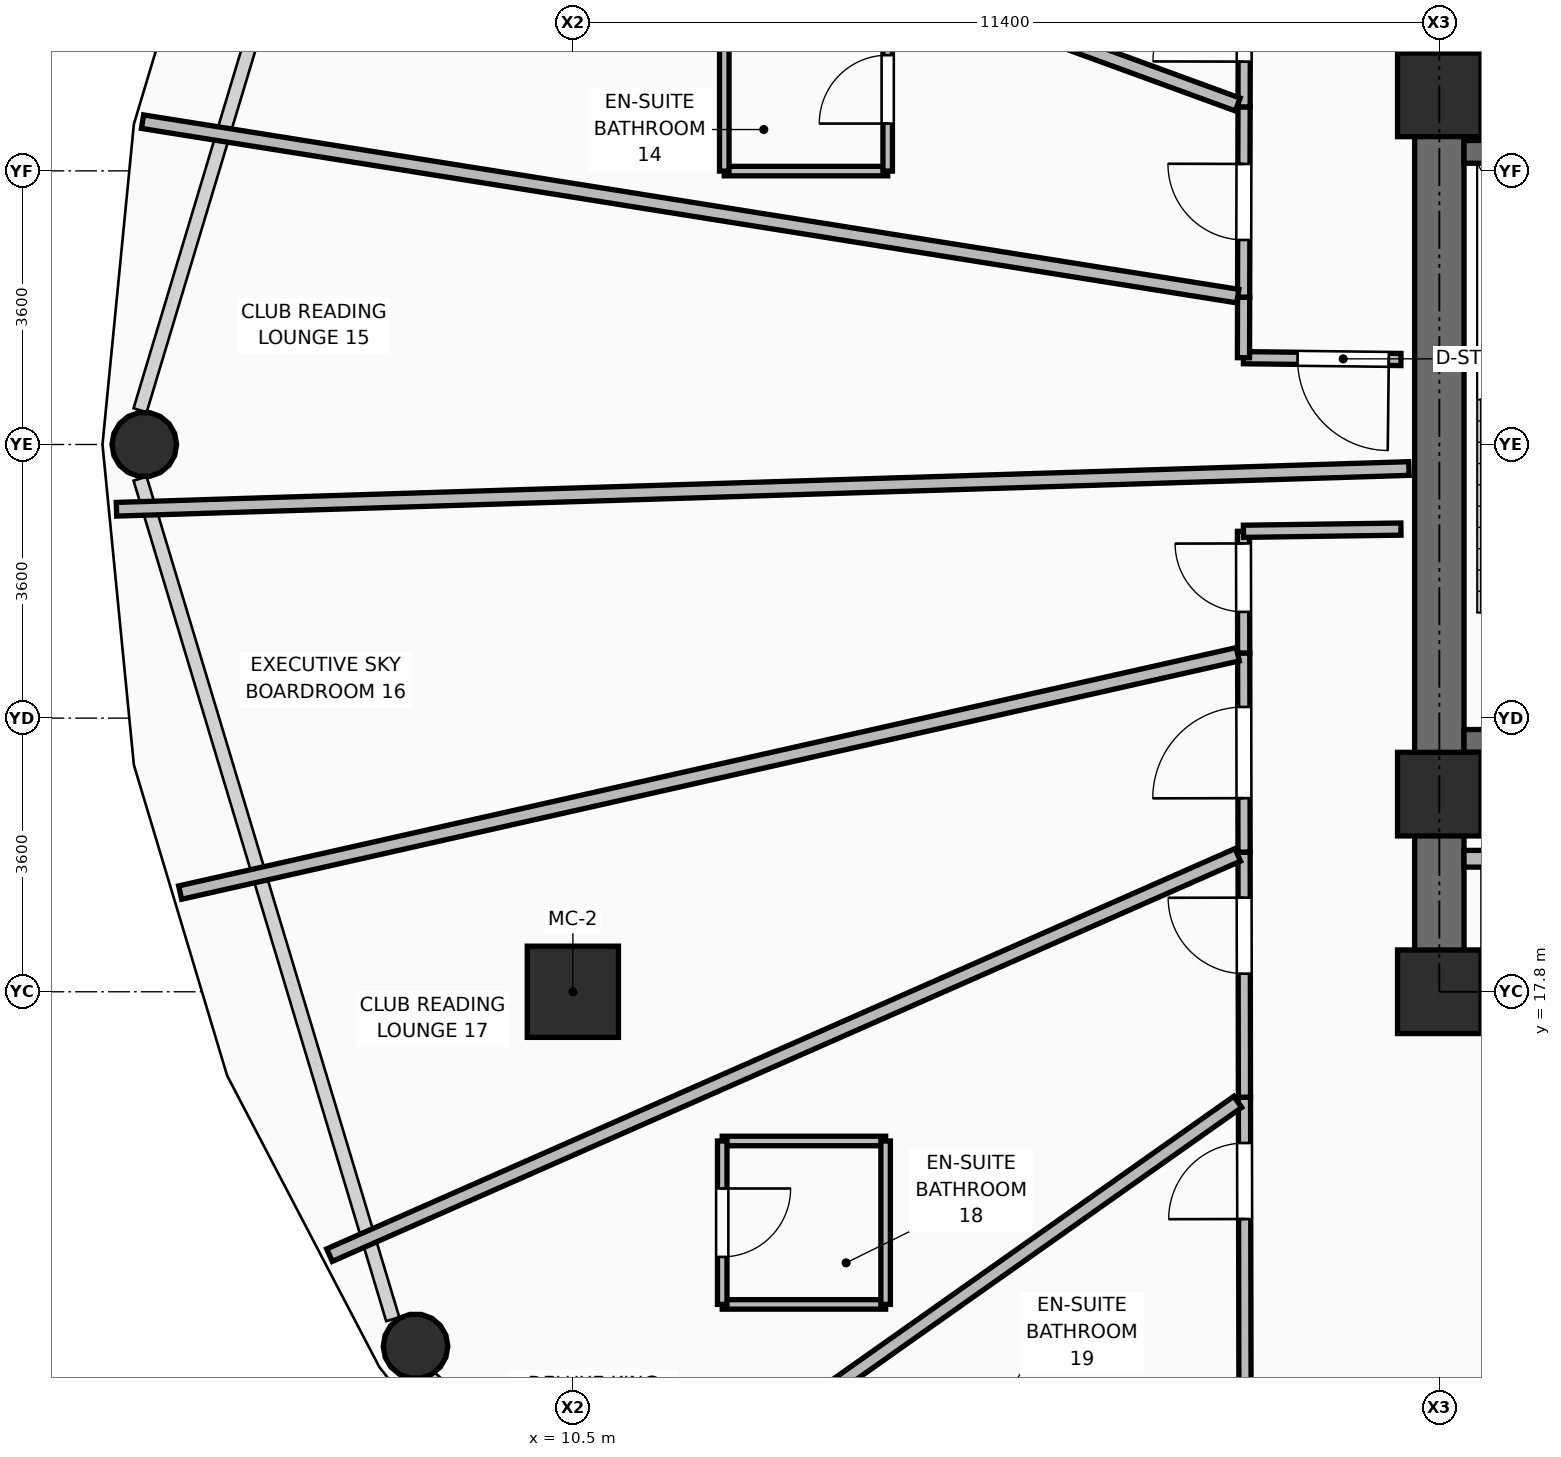
"""IFC4 building model, lengths in metres.
Left out: names, types, materials, properties, quantities, classifications, styles, units other than length and angle.
Written with IfcOpenShell. Run it as: python <this file> out.ifc"""

import sys

from ifc_helpers import new_model, si_unit, direction, frame, frame_2d, origin, origin_2d, place, context, subcontext, project, spatial, rectangle, hollow_rectangle, hollow_circle, extrude, element, fill, save


model = new_model("IFC4")
c1 = context("Model", 3, precision=1e-05, world=origin(), true_north=direction((0.0, 1.0)))
c2 = subcontext(c1, "Body", "Model", "MODEL_VIEW")
j1 = project(units=[si_unit("LENGTHUNIT", "METRE"), si_unit("PLANEANGLEUNIT", "RADIAN")], contexts=[c1])
p1 = place(None, origin())
s1 = spatial("IfcSite", under=j1, at=p1, CompositionType="ELEMENT")
p2 = place(p1, origin())
s2 = spatial("IfcBuilding", under=s1, at=p2, CompositionType="ELEMENT")
p3 = place(p2, frame((0.0, 0.0, 53.25)))
s3 = spatial("IfcBuildingStorey", under=s2, at=p3, CompositionType="ELEMENT", Elevation=53.25)
for number, where, z_axis, x_axis in (
    (1, (21.9, 17.8, 0.0), (0.0, 0.0, 1.0), (1.0, 0.0, 0.0)),
    (2, (21.9, 20.4, 0.0), (0.0, 0.0, 1.0), (1.0, 0.0, 0.0)),
    (3, (21.9, 29.6, 0.0), (0.0, 0.0, 1.0), (1.0, 0.0, 0.0)),
):
    element("IfcColumn", number, at=place(p3, frame(where, z_axis=z_axis, x_axis=x_axis)), inside=s3, PredefinedType="COLUMN", context=c2, shape_type="SweptSolid", body=[
        extrude(rectangle(XDim=1.1, YDim=1.1, at=origin_2d()), origin(), (0.0, 0.0, 1.0), 3.75),
    ])
p4 = place(p3, frame((10.5, 17.8, 0.0), z_axis=(0.0, 0.0, 1.0), x_axis=(1.0, 0.0, 0.0)))
e4 = element("IfcColumn", 4, at=p4, inside=s3, PredefinedType="COLUMN", context=c2, shape_type="SweptSolid", body=[
    extrude(hollow_rectangle(XDim=1.2, YDim=1.2, WallThickness=0.045, at=origin_2d()), origin(), (0.0, 0.0, 1.0), 3.75),
])
p5 = place(p3, frame((4.861, 25.0, 0.0), z_axis=(-0.221785382613, 0.0, 0.975095505096), x_axis=(0.0, -1.0, 0.0)))
e5 = element("IfcColumn", 5, at=p5, inside=s3, PredefinedType="COLUMN", context=c2, shape_type="SweptSolid", body=[
    extrude(hollow_circle(Radius=0.425, WallThickness=0.04, at=origin_2d()), origin(), (0.0, 0.0, 1.0), 3.661),
])
p6 = place(p3, frame((8.43, 13.137, 0.0), z_axis=(-0.192218909821, -0.099280833242, 0.976317165095), x_axis=(0.458902314779, -0.888486727808, 0.0)))
e6 = element("IfcColumn", 6, at=p6, inside=s3, PredefinedType="COLUMN", context=c2, shape_type="SweptSolid", body=[
    extrude(hollow_circle(Radius=0.425, WallThickness=0.04, at=origin_2d()), origin(), (0.0, 0.0, 1.0), 3.657),
])
p7 = place(p3, frame((21.575, 17.8, 0.0), z_axis=(0.0, 0.0, 1.0), x_axis=(1.0, 0.0, 0.0)))
e7 = element("IfcWall", 7, at=p7, inside=s3, PredefinedType="SHEAR", context=c2, shape_type="SweptSolid", body=[
    extrude(rectangle(XDim=2.175, YDim=0.65, at=frame_2d((1.087, 0.0))), origin(), (0.0, 0.0, 1.0), 3.57),
])
p8 = place(p3, frame((21.9, 18.125, 0.0), z_axis=(0.0, 0.0, 1.0), x_axis=(0.0, 1.0, 0.0)))
e8 = element("IfcWall", 8, at=p8, inside=s3, PredefinedType="SHEAR", context=c2, shape_type="SweptSolid", body=[
    extrude(rectangle(XDim=14.0, YDim=0.65, at=frame_2d((7.0, 0.0))), origin(), (0.0, 0.0, 1.0), 3.57),
])
p9 = place(p3, frame((22.225, 21.1, 0.0), z_axis=(0.0, 0.0, 1.0), x_axis=(1.0, 0.0, 0.0)))
e9 = element("IfcWall", 9, at=p9, inside=s3, PredefinedType="SHEAR", context=c2, shape_type="SweptSolid", body=[
    extrude(rectangle(XDim=3.515, YDim=0.3, at=frame_2d((1.757, 0.0))), origin(), (0.0, 0.0, 1.0), 3.57),
])
p10 = place(p9, frame((1.995, 0.0, 0.0)))
e10 = element("IfcOpeningElement", 10, at=p10, cuts=e9, PredefinedType="OPENING", context=c2, shape_type="SweptSolid", body=[
    extrude(rectangle(XDim=1.05, YDim=2.1, at=frame_2d((0.525, 1.05))), frame((0.0, 0.16, 0.0), z_axis=(0.0, -1.0, 0.0), x_axis=(1.0, 0.0, 0.0)), (0.0, 0.0, 1.0), 0.32),
])
p11 = place(p3, frame((22.225, 28.85, 0.0), z_axis=(0.0, 0.0, 1.0), x_axis=(1.0, 0.0, 0.0)))
e11 = element("IfcWall", 11, at=p11, inside=s3, PredefinedType="SHEAR", context=c2, shape_type="SweptSolid", body=[
    extrude(rectangle(XDim=3.515, YDim=0.3, at=frame_2d((1.757, 0.0))), origin(), (0.0, 0.0, 1.0), 3.57),
])
p12 = place(p3, frame((22.225, 19.55, 0.0), z_axis=(0.0, 0.0, 1.0), x_axis=(1.0, 0.0, 0.0)))
e12 = element("IfcWall", 12, at=p12, inside=s3, PredefinedType="PARTITIONING", context=c2, shape_type="SweptSolid", body=[
    extrude(rectangle(XDim=1.565, YDim=0.22, at=frame_2d((0.782, 0.0))), origin(), (0.0, 0.0, 1.0), 2.595),
])
p13 = place(p3, frame((21.395, 26.118, 0.0), z_axis=(0.0, 0.0, 1.0), x_axis=(-0.999931972005, 0.011664105718, 0.0)))
e13 = element("IfcWall", 13, at=p13, inside=s3, PredefinedType="PARTITIONING", context=c2, shape_type="SweptSolid", body=[
    extrude(rectangle(XDim=2.072, YDim=0.16, at=frame_2d((1.036, 0.0))), origin(), (0.0, 0.0, 1.0), 3.55),
])
p14 = place(p13, frame((0.16, 0.0, 0.0)))
e14 = element("IfcOpeningElement", 14, at=p14, cuts=e13, PredefinedType="OPENING", context=c2, shape_type="SweptSolid", body=[
    extrude(rectangle(XDim=1.2, YDim=2.1, at=frame_2d((0.6, 1.05))), frame((0.0, 0.09, 0.0), z_axis=(0.0, -1.0, 0.0), x_axis=(1.0, 0.0, 0.0)), (0.0, 0.0, 1.0), 0.18),
])
p15 = place(p3, frame((19.323, 26.142, 0.0), z_axis=(0.0, 0.0, 1.0), x_axis=(0.00245097303, 0.999996996361, 0.0)))
e15 = element("IfcWall", 15, at=p15, inside=s3, PredefinedType="PARTITIONING", context=c2, shape_type="SweptSolid", body=[
    extrude(rectangle(XDim=0.797, YDim=0.16, at=frame_2d((0.398, 0.0))), origin(), (0.0, 0.0, 1.0), 3.55),
])
p16 = place(p3, frame((19.325, 26.939, 0.0), z_axis=(0.0, 0.0, 1.0), x_axis=(0.002438541325, 0.999997026754, 0.0)))
e16 = element("IfcWall", 16, at=p16, inside=s3, PredefinedType="PARTITIONING", context=c2, shape_type="SweptSolid", body=[
    extrude(rectangle(XDim=2.503, YDim=0.16, at=frame_2d((1.251, 0.0))), origin(), (0.0, 0.0, 1.0), 3.55),
])
p17 = place(p16, frame((0.752, 0.0, 0.0)))
e17 = element("IfcOpeningElement", 17, at=p17, cuts=e16, PredefinedType="OPENING", context=c2, shape_type="SweptSolid", body=[
    extrude(rectangle(XDim=1.0, YDim=2.1, at=frame_2d((0.5, 1.05))), frame((0.0, 0.09, 0.0), z_axis=(0.0, -1.0, 0.0), x_axis=(1.0, 0.0, 0.0)), (0.0, 0.0, 1.0), 0.18),
])
p18 = place(p3, frame((19.331, 29.442, 0.0), z_axis=(0.0, 0.0, 1.0), x_axis=(0.002301489877, 0.999997351569, 0.0)))
e18 = element("IfcWall", 18, at=p18, inside=s3, PredefinedType="PARTITIONING", context=c2, shape_type="SweptSolid", body=[
    extrude(rectangle(XDim=2.97, YDim=0.16, at=frame_2d((1.485, 0.0))), origin(), (0.0, 0.0, 1.0), 3.55),
])
p19 = place(p18, frame((0.595, 0.0, 0.0)))
e19 = element("IfcOpeningElement", 19, at=p19, cuts=e18, PredefinedType="OPENING", context=c2, shape_type="SweptSolid", body=[
    extrude(rectangle(XDim=1.2, YDim=2.1, at=frame_2d((0.6, 1.05))), frame((0.0, 0.09, 0.0), z_axis=(0.0, -1.0, 0.0), x_axis=(1.0, 0.0, 0.0)), (0.0, 0.0, 1.0), 0.18),
])
p20 = place(p3, frame((19.344, 11.992, 0.0), z_axis=(0.0, 0.0, 1.0), x_axis=(-0.001822295279, 0.999998339619, 0.0)))
e20 = element("IfcWall", 20, at=p20, inside=s3, PredefinedType="PARTITIONING", context=c2, shape_type="SweptSolid", body=[
    extrude(rectangle(XDim=4.421, YDim=0.16, at=frame_2d((2.21, 0.0))), origin(), (0.0, 0.0, 1.0), 3.55),
])
p21 = place(p20, frame((2.818, 0.0, 0.0)))
e21 = element("IfcOpeningElement", 21, at=p21, cuts=e20, PredefinedType="OPENING", context=c2, shape_type="SweptSolid", body=[
    extrude(rectangle(XDim=1.0, YDim=2.1, at=frame_2d((0.5, 1.05))), frame((0.0, 0.09, 0.0), z_axis=(0.0, -1.0, 0.0), x_axis=(1.0, 0.0, 0.0)), (0.0, 0.0, 1.0), 0.18),
])
p22 = place(p3, frame((19.336, 16.413, 0.0), z_axis=(0.0, 0.0, 1.0), x_axis=(-0.001514576074, 0.999998853029, 0.0)))
e22 = element("IfcWall", 22, at=p22, inside=s3, PredefinedType="PARTITIONING", context=c2, shape_type="SweptSolid", body=[
    extrude(rectangle(XDim=3.224, YDim=0.16, at=frame_2d((1.612, 0.0))), origin(), (0.0, 0.0, 1.0), 2.928),
])
p23 = place(p22, frame((1.625, 0.0, 0.0)))
e23 = element("IfcOpeningElement", 23, at=p23, cuts=e22, PredefinedType="OPENING", context=c2, shape_type="SweptSolid", body=[
    extrude(rectangle(XDim=1.0, YDim=2.1, at=frame_2d((0.5, 1.05))), frame((0.0, 0.09, 0.0), z_axis=(0.0, -1.0, 0.0), x_axis=(1.0, 0.0, 0.0)), (0.0, 0.0, 1.0), 0.18),
])
p24 = place(p3, frame((19.331, 19.637, 0.0), z_axis=(0.0, 0.0, 1.0), x_axis=(-0.001956761069, 0.999998085541, 0.0)))
e24 = element("IfcWall", 24, at=p24, inside=s3, PredefinedType="PARTITIONING", context=c2, shape_type="SweptSolid", body=[
    extrude(rectangle(XDim=2.62, YDim=0.16, at=frame_2d((1.31, 0.0))), origin(), (0.0, 0.0, 1.0), 2.928),
])
p25 = place(p24, frame((0.71, 0.0, 0.0)))
e25 = element("IfcOpeningElement", 25, at=p25, cuts=e24, PredefinedType="OPENING", context=c2, shape_type="SweptSolid", body=[
    extrude(rectangle(XDim=1.2, YDim=2.1, at=frame_2d((0.6, 1.05))), frame((0.0, 0.09, 0.0), z_axis=(0.0, -1.0, 0.0), x_axis=(1.0, 0.0, 0.0)), (0.0, 0.0, 1.0), 0.18),
])
p26 = place(p3, frame((19.326, 22.257, 0.0), z_axis=(0.0, 0.0, 1.0), x_axis=(-0.001830102166, 0.999998325362, 0.0)))
e26 = element("IfcWall", 26, at=p26, inside=s3, PredefinedType="PARTITIONING", context=c2, shape_type="SweptSolid", body=[
    extrude(rectangle(XDim=1.601, YDim=0.16, at=frame_2d((0.8, 0.0))), origin(), (0.0, 0.0, 1.0), 3.55),
])
p27 = place(p26, frame((0.541, 0.0, 0.0)))
e27 = element("IfcOpeningElement", 27, at=p27, cuts=e26, PredefinedType="OPENING", context=c2, shape_type="SweptSolid", body=[
    extrude(rectangle(XDim=0.9, YDim=2.1, at=frame_2d((0.45, 1.05))), frame((0.0, 0.09, 0.0), z_axis=(0.0, -1.0, 0.0), x_axis=(1.0, 0.0, 0.0)), (0.0, 0.0, 1.0), 0.18),
])
p28 = place(p3, frame((19.323, 23.858, 0.0), z_axis=(0.0, 0.0, 1.0), x_axis=(0.999901714038, 0.014020066451, 0.0)))
e28 = element("IfcWall", 28, at=p28, inside=s3, PredefinedType="PARTITIONING", context=c2, shape_type="SweptSolid", body=[
    extrude(rectangle(XDim=2.072, YDim=0.16, at=frame_2d((1.036, 0.0))), origin(), (0.0, 0.0, 1.0), 3.55),
])
p29 = place(p3, frame((19.248, 29.473, 0.0), z_axis=(0.0, 0.0, 1.0), x_axis=(-0.939376353179, 0.34288783456, 0.0)))
e29 = element("IfcWall", 29, at=p29, inside=s3, PredefinedType="PARTITIONING", context=c2, shape_type="SweptSolid", body=[
    extrude(rectangle(XDim=13.576, YDim=0.18, at=frame_2d((6.788, 0.0))), origin(), (0.0, 0.0, 1.0), 2.775),
])
p30 = place(p3, frame((19.248, 26.952, 0.0), z_axis=(0.0, 0.0, 1.0), x_axis=(-0.987552205461, 0.157291581112, 0.0)))
e30 = element("IfcWall", 30, at=p30, inside=s3, PredefinedType="PARTITIONING", context=c2, shape_type="SweptSolid", body=[
    extrude(rectangle(XDim=14.592, YDim=0.18, at=frame_2d((7.296, 0.0))), origin(), (0.0, 0.0, 1.0), 2.775),
])
p31 = place(p3, frame((21.5, 24.684, 0.0), z_axis=(0.0, 0.0, 1.0), x_axis=(-0.999503357518, -0.031512510382, 0.0)))
e31 = element("IfcWall", 31, at=p31, inside=s3, PredefinedType="PARTITIONING", context=c2, shape_type="SweptSolid", body=[
    extrude(rectangle(XDim=17.013, YDim=0.18, at=frame_2d((8.507, 0.0))), origin(), (0.0, 0.0, 1.0), 2.595),
])
p32 = place(p3, frame((19.248, 22.24, 0.0), z_axis=(0.0, 0.0, 1.0), x_axis=(-0.975547769482, -0.219787509789, 0.0)))
e32 = element("IfcWall", 32, at=p32, inside=s3, PredefinedType="PARTITIONING", context=c2, shape_type="SweptSolid", body=[
    extrude(rectangle(XDim=14.264, YDim=0.18, at=frame_2d((7.132, 0.0))), origin(), (0.0, 0.0, 1.0), 2.775),
])
p33 = place(p3, frame((19.248, 19.601, 0.0), z_axis=(0.0, 0.0, 1.0), x_axis=(-0.915085250617, -0.403260442025, 0.0)))
e33 = element("IfcWall", 33, at=p33, inside=s3, PredefinedType="PARTITIONING", context=c2, shape_type="SweptSolid", body=[
    extrude(rectangle(XDim=13.059, YDim=0.18, at=frame_2d((6.529, 0.0))), origin(), (0.0, 0.0, 1.0), 2.775),
])
p34 = place(p3, frame((19.248, 16.351, 0.0), z_axis=(0.0, 0.0, 1.0), x_axis=(-0.816958598031, -0.576696323123, 0.0)))
e34 = element("IfcWall", 34, at=p34, inside=s3, PredefinedType="PARTITIONING", context=c2, shape_type="SweptSolid", body=[
    extrude(rectangle(XDim=10.954, YDim=0.18, at=frame_2d((5.477, 0.0))), origin(), (0.0, 0.0, 1.0), 2.775),
])
for number, where, z_axis, x_axis in (
    (35, (12.492, 28.597, 0.0), (0.0, 0.0, 1.0), (1.0, 0.0, 0.0)),
    (36, (12.492, 28.597, 0.0), (0.0, 0.0, 1.0), (0.0, 1.0, 0.0)),
):
    element("IfcWall", number, at=place(p3, frame(where, z_axis=z_axis, x_axis=x_axis)), inside=s3, PredefinedType="PARTITIONING", context=c2, shape_type="SweptSolid", body=[
        extrude(rectangle(XDim=2.15, YDim=0.125, at=frame_2d((1.075, 0.0))), origin(), (0.0, 0.0, 1.0), 3.55),
    ])
p35 = place(p3, frame((14.642, 28.597, 0.0), z_axis=(0.0, 0.0, 1.0), x_axis=(0.0, 1.0, 0.0)))
e37 = element("IfcWall", 37, at=p35, inside=s3, PredefinedType="PARTITIONING", context=c2, shape_type="SweptSolid", body=[
    extrude(rectangle(XDim=2.15, YDim=0.125, at=frame_2d((1.075, 0.0))), origin(), (0.0, 0.0, 1.0), 3.55),
])
p36 = place(p35, frame((0.625, 0.0, 0.0)))
e38 = element("IfcOpeningElement", 38, at=p36, cuts=e37, PredefinedType="OPENING", context=c2, shape_type="SweptSolid", body=[
    extrude(rectangle(XDim=0.9, YDim=2.1, at=frame_2d((0.45, 1.05))), frame((0.0, 0.073, 0.0), z_axis=(0.0, -1.0, 0.0), x_axis=(1.0, 0.0, 0.0)), (0.0, 0.0, 1.0), 0.145),
])
for number, where, z_axis, x_axis in (
    (39, (12.465, 13.687, 0.0), (0.0, 0.0, 1.0), (1.0, 0.0, 0.0)),
    (40, (12.465, 15.837, 0.0), (0.0, 0.0, 1.0), (1.0, 0.0, 0.0)),
):
    element("IfcWall", number, at=place(p3, frame(where, z_axis=z_axis, x_axis=x_axis)), inside=s3, PredefinedType="PARTITIONING", context=c2, shape_type="SweptSolid", body=[
        extrude(rectangle(XDim=2.15, YDim=0.125, at=frame_2d((1.075, 0.0))), origin(), (0.0, 0.0, 1.0), 3.55),
    ])
p37 = place(p3, frame((12.465, 13.687, 0.0), z_axis=(0.0, 0.0, 1.0), x_axis=(0.0, 1.0, 0.0)))
e41 = element("IfcWall", 41, at=p37, inside=s3, PredefinedType="PARTITIONING", context=c2, shape_type="SweptSolid", body=[
    extrude(rectangle(XDim=2.15, YDim=0.125, at=frame_2d((1.075, 0.0))), origin(), (0.0, 0.0, 1.0), 2.928),
])
p38 = place(p37, frame((0.625, 0.0, 0.0)))
e42 = element("IfcOpeningElement", 42, at=p38, cuts=e41, PredefinedType="OPENING", context=c2, shape_type="SweptSolid", body=[
    extrude(rectangle(XDim=0.9, YDim=2.1, at=frame_2d((0.45, 1.05))), frame((0.0, 0.073, 0.0), z_axis=(0.0, -1.0, 0.0), x_axis=(1.0, 0.0, 0.0)), (0.0, 0.0, 1.0), 0.145),
])
p39 = place(p3, frame((14.615, 13.687, 0.0), z_axis=(0.0, 0.0, 1.0), x_axis=(0.0, 1.0, 0.0)))
e43 = element("IfcWall", 43, at=p39, inside=s3, PredefinedType="PARTITIONING", context=c2, shape_type="SweptSolid", body=[
    extrude(rectangle(XDim=2.15, YDim=0.125, at=frame_2d((1.075, 0.0))), origin(), (0.0, 0.0, 1.0), 2.928),
])
p40 = place(p19, origin())
e44 = element("IfcDoor", 44, at=p40, inside=s3, OperationType="SINGLE_SWING_LEFT", PredefinedType="DOOR", context=c2, shape_type="SweptSolid", body=[
    extrude(rectangle(XDim=1.2, YDim=2.1, at=frame_2d((0.6, 1.05))), frame((0.0, 0.025, 0.0), z_axis=(0.0, -1.0, 0.0), x_axis=(1.0, 0.0, 0.0)), (0.0, 0.0, 1.0), 0.05),
])
fill(e19, e44)
p41 = place(p36, origin())
e45 = element("IfcDoor", 45, at=p41, inside=s3, OperationType="SINGLE_SWING_LEFT", PredefinedType="DOOR", context=c2, shape_type="SweptSolid", body=[
    extrude(rectangle(XDim=0.9, YDim=2.1, at=frame_2d((0.45, 1.05))), frame((0.0, 0.025, 0.0), z_axis=(0.0, -1.0, 0.0), x_axis=(1.0, 0.0, 0.0)), (0.0, 0.0, 1.0), 0.05),
])
fill(e38, e45)
p42 = place(p17, origin())
e46 = element("IfcDoor", 46, at=p42, inside=s3, OperationType="SINGLE_SWING_RIGHT", PredefinedType="DOOR", context=c2, shape_type="SweptSolid", body=[
    extrude(rectangle(XDim=1.0, YDim=2.1, at=frame_2d((0.5, 1.05))), frame((0.0, 0.025, 0.0), z_axis=(0.0, -1.0, 0.0), x_axis=(1.0, 0.0, 0.0)), (0.0, 0.0, 1.0), 0.05),
])
fill(e17, e46)
p43 = place(p14, origin())
e47 = element("IfcDoor", 47, at=p43, inside=s3, OperationType="SINGLE_SWING_LEFT", PredefinedType="DOOR", context=c2, shape_type="SweptSolid", body=[
    extrude(rectangle(XDim=1.2, YDim=2.1, at=frame_2d((0.6, 1.05))), frame((0.0, 0.025, 0.0), z_axis=(0.0, -1.0, 0.0), x_axis=(1.0, 0.0, 0.0)), (0.0, 0.0, 1.0), 0.05),
])
fill(e14, e47)
p44 = place(p27, origin())
e48 = element("IfcDoor", 48, at=p44, inside=s3, OperationType="SINGLE_SWING_RIGHT", PredefinedType="DOOR", context=c2, shape_type="SweptSolid", body=[
    extrude(rectangle(XDim=0.9, YDim=2.1, at=frame_2d((0.45, 1.05))), frame((0.0, 0.025, 0.0), z_axis=(0.0, -1.0, 0.0), x_axis=(1.0, 0.0, 0.0)), (0.0, 0.0, 1.0), 0.05),
])
fill(e27, e48)
p45 = place(p25, origin())
e49 = element("IfcDoor", 49, at=p45, inside=s3, OperationType="SINGLE_SWING_LEFT", PredefinedType="DOOR", context=c2, shape_type="SweptSolid", body=[
    extrude(rectangle(XDim=1.2, YDim=2.1, at=frame_2d((0.6, 1.05))), frame((0.0, 0.025, 0.0), z_axis=(0.0, -1.0, 0.0), x_axis=(1.0, 0.0, 0.0)), (0.0, 0.0, 1.0), 0.05),
])
fill(e25, e49)
p46 = place(p38, frame((0.9, 0.0, 0.0), z_axis=(0.0, 0.0, 1.0), x_axis=(-1.0, 0.0, 0.0)))
e50 = element("IfcDoor", 50, at=p46, inside=s3, OperationType="SINGLE_SWING_LEFT", PredefinedType="DOOR", context=c2, shape_type="SweptSolid", body=[
    extrude(rectangle(XDim=0.9, YDim=2.1, at=frame_2d((0.45, 1.05))), frame((0.0, 0.025, 0.0), z_axis=(0.0, -1.0, 0.0), x_axis=(1.0, 0.0, 0.0)), (0.0, 0.0, 1.0), 0.05),
])
fill(e42, e50)
p47 = place(p23, origin())
e51 = element("IfcDoor", 51, at=p47, inside=s3, OperationType="SINGLE_SWING_RIGHT", PredefinedType="DOOR", context=c2, shape_type="SweptSolid", body=[
    extrude(rectangle(XDim=1.0, YDim=2.1, at=frame_2d((0.5, 1.05))), frame((0.0, 0.025, 0.0), z_axis=(0.0, -1.0, 0.0), x_axis=(1.0, 0.0, 0.0)), (0.0, 0.0, 1.0), 0.05),
])
fill(e23, e51)
p48 = place(p21, origin())
e52 = element("IfcDoor", 52, at=p48, inside=s3, OperationType="SINGLE_SWING_LEFT", PredefinedType="DOOR", context=c2, shape_type="SweptSolid", body=[
    extrude(rectangle(XDim=1.0, YDim=2.1, at=frame_2d((0.5, 1.05))), frame((0.0, 0.025, 0.0), z_axis=(0.0, -1.0, 0.0), x_axis=(1.0, 0.0, 0.0)), (0.0, 0.0, 1.0), 0.05),
])
fill(e21, e52)
save(model, sys.argv[1])
